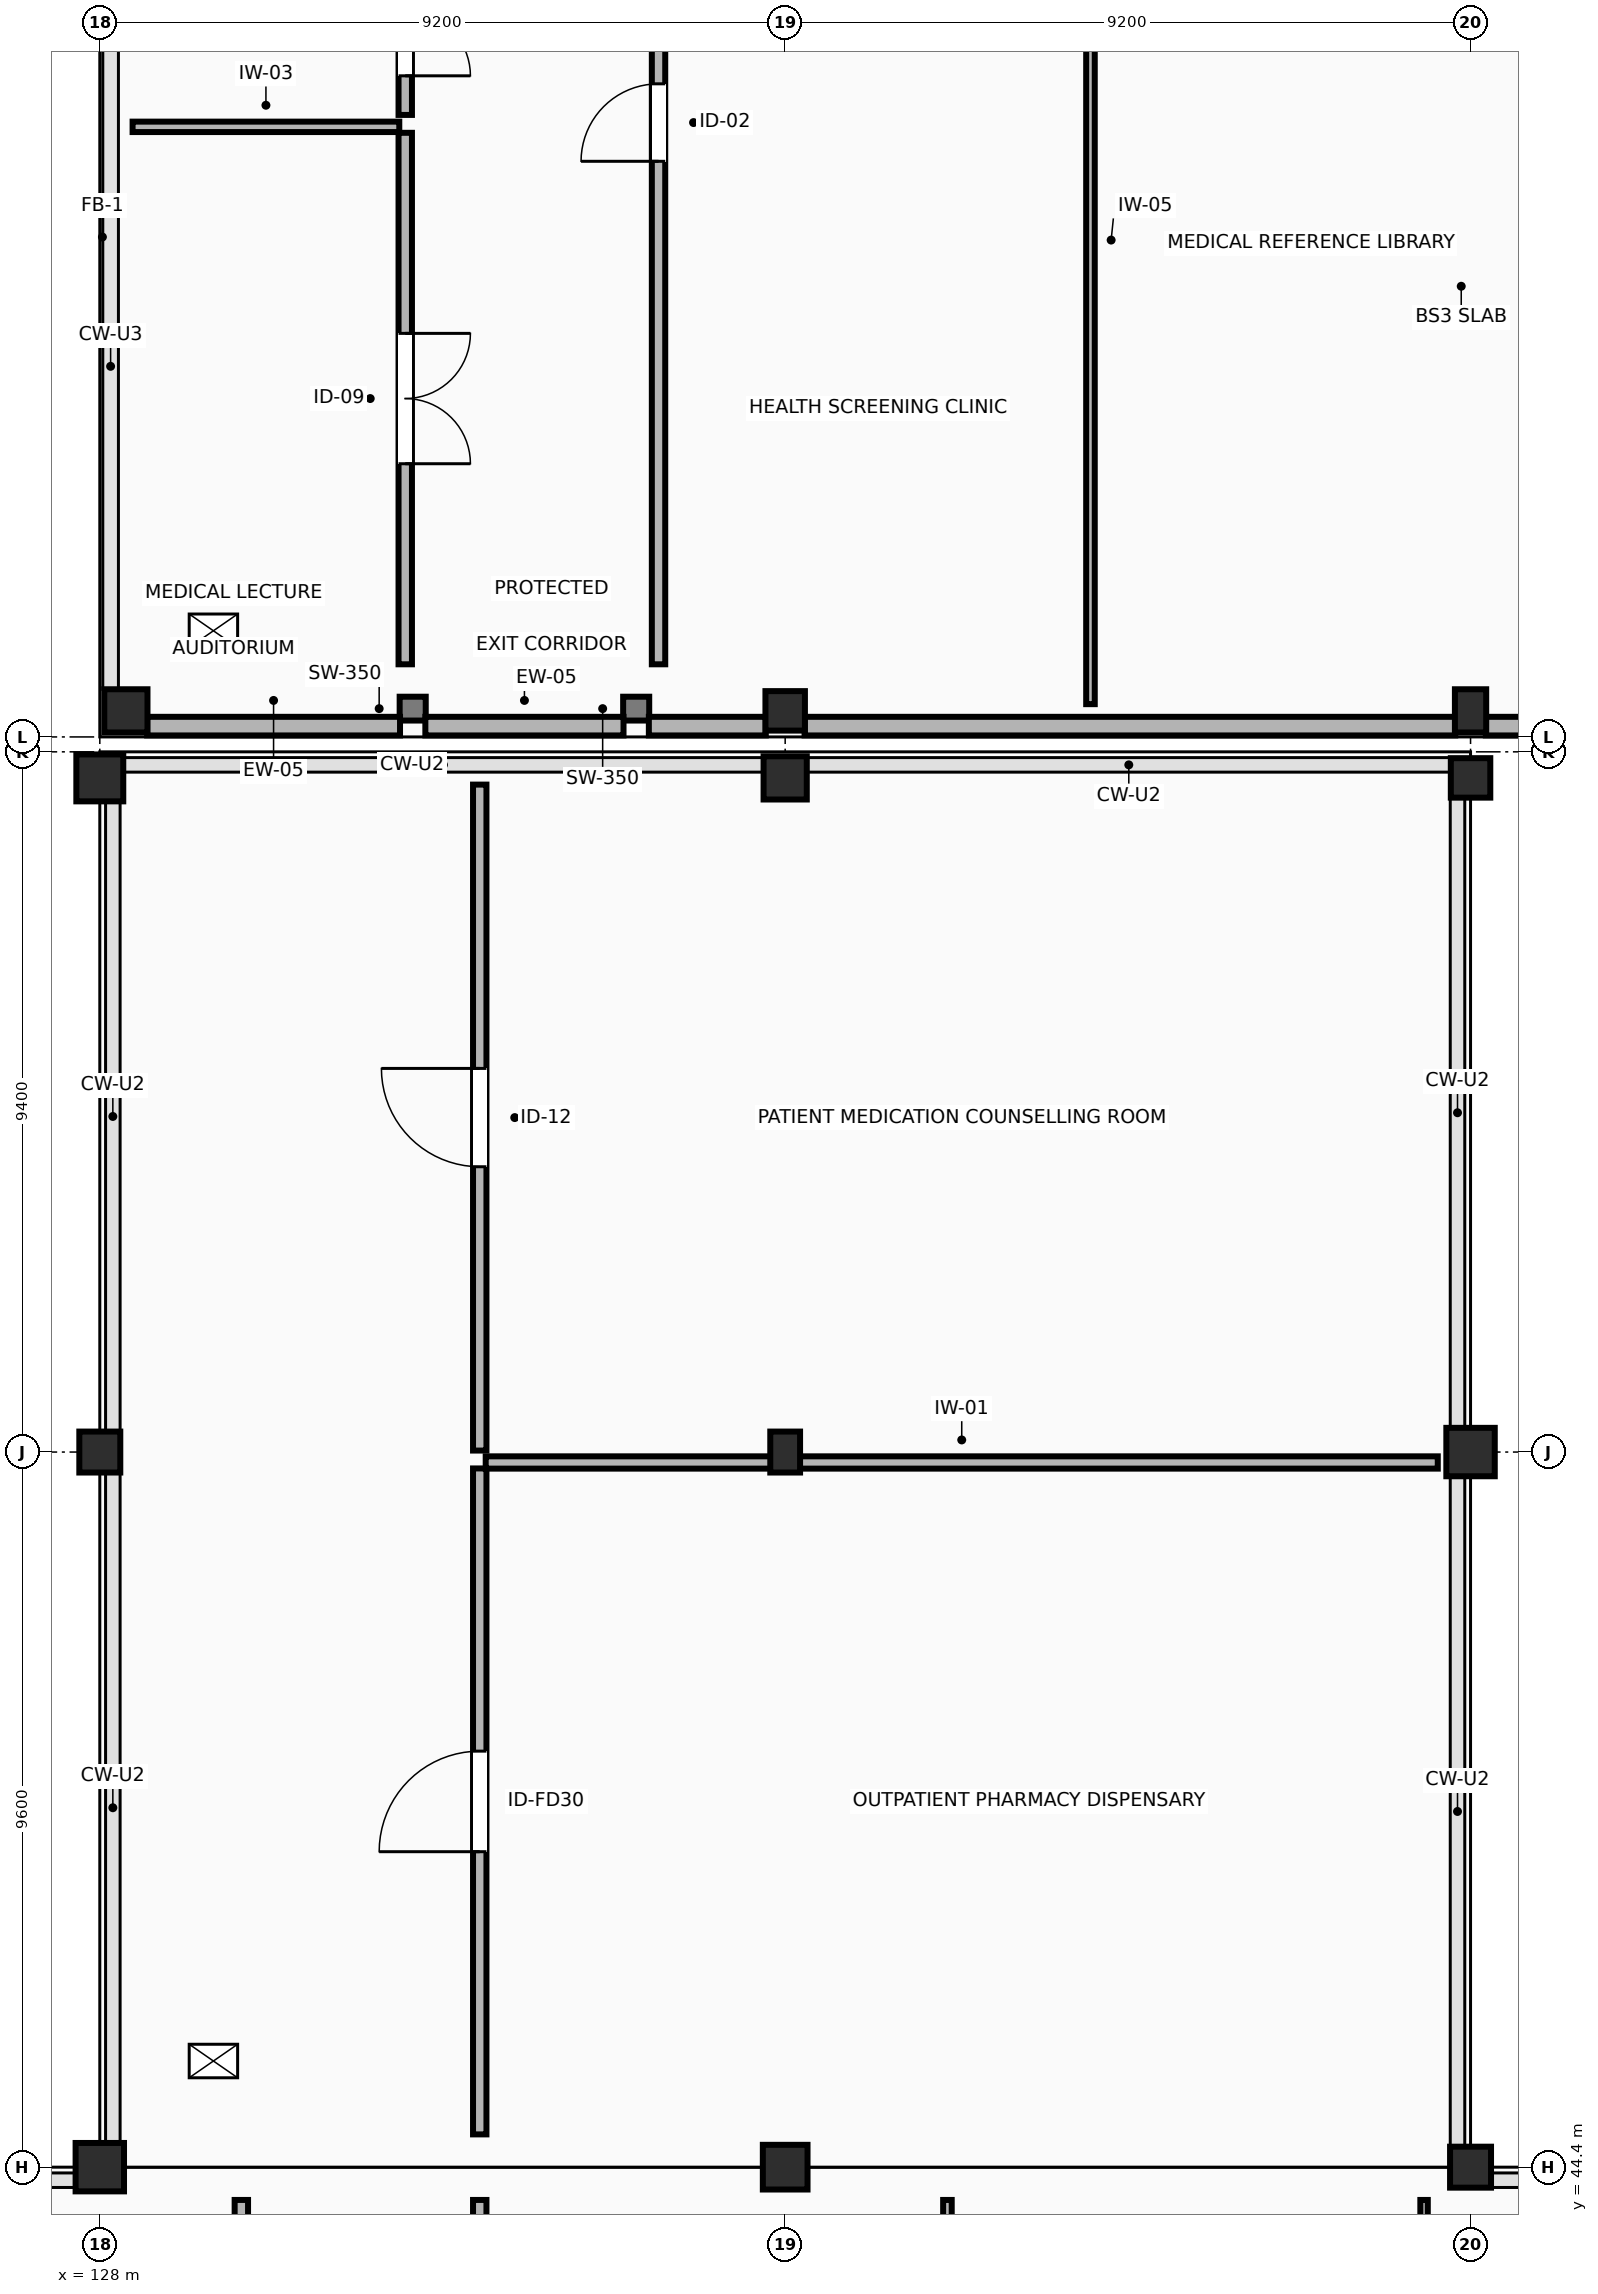
"""IFC4 building model, lengths in metres.
Left out: names, types, materials, properties, quantities, classifications, styles, units other than length and angle.
Written with IfcOpenShell. Run it as: python <this file> out.ifc"""

import sys

from ifc_helpers import new_model, si_unit, direction, frame, frame_2d, origin, origin_2d, place, context, subcontext, project, spatial, rectangle, extrude, element, fill, save


model = new_model("IFC4")
c1 = context("Model", 3, precision=1e-05, world=origin(), true_north=direction((0.0, 1.0)))
c2 = subcontext(c1, "Body", "Model", "MODEL_VIEW")
j1 = project(units=[si_unit("LENGTHUNIT", "METRE"), si_unit("PLANEANGLEUNIT", "RADIAN")], contexts=[c1])
p1 = place(None, origin())
s1 = spatial("IfcSite", under=j1, at=p1, CompositionType="ELEMENT")
p2 = place(p1, origin())
s2 = spatial("IfcBuilding", under=s1, at=p2, CompositionType="ELEMENT")
p3 = place(p2, origin())
s3 = spatial("IfcBuildingStorey", under=s2, at=p3, CompositionType="ELEMENT", Elevation=0.0)
p4 = place(p3, frame((128.0, 44.4, 0.0), z_axis=(0.0, 0.0, 1.0), x_axis=(1.0, 0.0, 0.0)))
e1 = element("IfcColumn", 1, at=p4, inside=s3, PredefinedType="COLUMN", context=c2, shape_type="SweptSolid", body=[
    extrude(rectangle(XDim=0.65, YDim=0.65, at=origin_2d()), origin(), (0.0, 0.0, 1.0), 5.4),
])
p5 = place(p3, frame((128.0, 54.0, -1.75), z_axis=(0.0, 0.0, 1.0), x_axis=(1.0, 0.0, 0.0)))
e2 = element("IfcColumn", 2, at=p5, inside=s3, PredefinedType="COLUMN", context=c2, shape_type="SweptSolid", body=[
    extrude(rectangle(XDim=0.55, YDim=0.55, at=origin_2d()), origin(), (0.0, 0.0, 1.0), 7.15),
])
p6 = place(p3, frame((128.0, 63.05, -1.75), z_axis=(0.0, 0.0, 1.0), x_axis=(1.0, 0.0, 0.0)))
e3 = element("IfcColumn", 3, at=p6, inside=s3, PredefinedType="COLUMN", context=c2, shape_type="SweptSolid", body=[
    extrude(rectangle(XDim=0.63, YDim=0.63, at=origin_2d()), origin(), (0.0, 0.0, 1.0), 7.15),
])
p7 = place(p3, frame((137.2, 44.4, 0.0), z_axis=(0.0, 0.0, 1.0), x_axis=(1.0, 0.0, 0.0)))
e4 = element("IfcColumn", 4, at=p7, inside=s3, PredefinedType="COLUMN", context=c2, shape_type="SweptSolid", body=[
    extrude(rectangle(XDim=0.6, YDim=0.6, at=origin_2d()), origin(), (0.0, 0.0, 1.0), 5.4),
])
p8 = place(p3, frame((137.2, 54.0, -1.75), z_axis=(0.0, 0.0, 1.0), x_axis=(1.0, 0.0, 0.0)))
e5 = element("IfcColumn", 5, at=p8, inside=s3, PredefinedType="COLUMN", context=c2, shape_type="SweptSolid", body=[
    extrude(rectangle(XDim=0.4, YDim=0.55, at=origin_2d()), origin(), (0.0, 0.0, 1.0), 7.15),
])
p9 = place(p3, frame((137.2, 63.05, -1.75), z_axis=(0.0, 0.0, 1.0), x_axis=(1.0, 0.0, 0.0)))
e6 = element("IfcColumn", 6, at=p9, inside=s3, PredefinedType="COLUMN", context=c2, shape_type="SweptSolid", body=[
    extrude(rectangle(XDim=0.58, YDim=0.58, at=origin_2d()), origin(), (0.0, 0.0, 1.0), 7.15),
])
p10 = place(p3, frame((146.4, 44.4, 0.0), z_axis=(0.0, 0.0, 1.0), x_axis=(1.0, 0.0, 0.0)))
e7 = element("IfcColumn", 7, at=p10, inside=s3, PredefinedType="COLUMN", context=c2, shape_type="SweptSolid", body=[
    extrude(rectangle(XDim=0.55, YDim=0.55, at=origin_2d()), origin(), (0.0, 0.0, 1.0), 5.4),
])
p11 = place(p3, frame((146.4, 54.0, -1.75), z_axis=(0.0, 0.0, 1.0), x_axis=(1.0, 0.0, 0.0)))
e8 = element("IfcColumn", 8, at=p11, inside=s3, PredefinedType="COLUMN", context=c2, shape_type="SweptSolid", body=[
    extrude(rectangle(XDim=0.65, YDim=0.65, at=origin_2d()), origin(), (0.0, 0.0, 1.0), 7.15),
])
p12 = place(p3, frame((146.4, 63.05, -1.75), z_axis=(0.0, 0.0, 1.0), x_axis=(1.0, 0.0, 0.0)))
e9 = element("IfcColumn", 9, at=p12, inside=s3, PredefinedType="COLUMN", context=c2, shape_type="SweptSolid", body=[
    extrude(rectangle(XDim=0.53, YDim=0.53, at=origin_2d()), origin(), (0.0, 0.0, 1.0), 7.15),
])
p13 = place(p3, frame((128.35, 63.95, -1.75), z_axis=(0.0, 0.0, 1.0), x_axis=(1.0, 0.0, 0.0)))
e10 = element("IfcColumn", 10, at=p13, inside=s3, PredefinedType="COLUMN", context=c2, shape_type="SweptSolid", body=[
    extrude(rectangle(XDim=0.58, YDim=0.58, at=origin_2d()), origin(), (0.0, 0.0, 1.0), 7.15),
])
p14 = place(p3, frame((137.2, 63.95, -1.75), z_axis=(0.0, 0.0, 1.0), x_axis=(1.0, 0.0, 0.0)))
e11 = element("IfcColumn", 11, at=p14, inside=s3, PredefinedType="COLUMN", context=c2, shape_type="SweptSolid", body=[
    extrude(rectangle(XDim=0.53, YDim=0.53, at=origin_2d()), origin(), (0.0, 0.0, 1.0), 7.15),
])
p15 = place(p3, frame((146.4, 63.95, -1.75), z_axis=(0.0, 0.0, 1.0), x_axis=(1.0, 0.0, 0.0)))
e12 = element("IfcColumn", 12, at=p15, inside=s3, PredefinedType="COLUMN", context=c2, shape_type="SweptSolid", body=[
    extrude(rectangle(XDim=0.42, YDim=0.58, at=origin_2d()), origin(), (0.0, 0.0, 1.0), 7.15),
])
for number, where, z_axis, x_axis in (
    (13, (132.2, 63.82, -1.75), (0.0, 0.0, 1.0), (0.0, 1.0, 0.0)),
    (14, (135.2, 63.82, -1.75), (0.0, 0.0, 1.0), (0.0, 1.0, 0.0)),
):
    element("IfcWall", number, at=place(p3, frame(where, z_axis=z_axis, x_axis=x_axis)), inside=s3, PredefinedType="SHEAR", context=c2, shape_type="SweptSolid", body=[
        extrude(rectangle(XDim=0.32, YDim=0.35, at=frame_2d((0.16, 0.0))), origin(), (0.0, 0.0, 1.0), 5.273),
    ])
p16 = place(p3, frame((128.635, 63.745, 0.0), z_axis=(0.0, 0.0, 1.0), x_axis=(1.0, 0.0, 0.0)))
e15 = element("IfcWall", 15, at=p16, inside=s3, PredefinedType="STANDARD", context=c2, shape_type="SweptSolid", body=[
    extrude(rectangle(XDim=3.395, YDim=0.25, at=frame_2d((1.698, 0.0))), origin(), (0.0, 0.0, 1.0), 3.508),
])
p17 = place(p3, frame((132.37, 63.745, 0.0), z_axis=(0.0, 0.0, 1.0), x_axis=(1.0, 0.0, 0.0)))
e16 = element("IfcWall", 16, at=p17, inside=s3, PredefinedType="STANDARD", context=c2, shape_type="SweptSolid", body=[
    extrude(rectangle(XDim=2.66, YDim=0.25, at=frame_2d((1.33, 0.0))), origin(), (0.0, 0.0, 1.0), 3.508),
])
p18 = place(p3, frame((135.37, 63.745, 0.0), z_axis=(0.0, 0.0, 1.0), x_axis=(1.0, 0.0, 0.0)))
e17 = element("IfcWall", 17, at=p18, inside=s3, PredefinedType="STANDARD", context=c2, shape_type="SweptSolid", body=[
    extrude(rectangle(XDim=1.57, YDim=0.25, at=frame_2d((0.785, 0.0))), origin(), (0.0, 0.0, 1.0), 3.508),
])
p19 = place(p3, frame((137.46, 63.745, 0.0), z_axis=(0.0, 0.0, 1.0), x_axis=(1.0, 0.0, 0.0)))
e18 = element("IfcWall", 18, at=p19, inside=s3, PredefinedType="STANDARD", context=c2, shape_type="SweptSolid", body=[
    extrude(rectangle(XDim=8.735, YDim=0.25, at=frame_2d((4.368, 0.0))), origin(), (0.0, 0.0, 1.0), 4.395),
])
p20 = place(p3, frame((146.605, 63.745, 0.0), z_axis=(0.0, 0.0, 1.0), x_axis=(1.0, 0.0, 0.0)))
e19 = element("IfcWall", 19, at=p20, inside=s3, PredefinedType="STANDARD", context=c2, shape_type="SweptSolid", body=[
    extrude(rectangle(XDim=8.885, YDim=0.25, at=frame_2d((4.442, 0.0))), origin(), (0.0, 0.0, 1.0), 4.395),
])
p21 = place(p20, frame((1.94, 0.0, 0.95)))
e20 = element("IfcOpeningElement", 20, at=p21, cuts=e19, PredefinedType="OPENING", context=c2, shape_type="SweptSolid", body=[
    extrude(rectangle(XDim=1.45, YDim=1.7, at=frame_2d((0.725, 0.85))), frame((0.0, 0.135, 0.0), z_axis=(0.0, -1.0, 0.0), x_axis=(1.0, 0.0, 0.0)), (0.0, 0.0, 1.0), 0.27),
])
p22 = place(p20, frame((5.494, 0.0, 0.95)))
e21 = element("IfcOpeningElement", 21, at=p22, cuts=e19, PredefinedType="OPENING", context=c2, shape_type="SweptSolid", body=[
    extrude(rectangle(XDim=1.45, YDim=1.7, at=frame_2d((0.725, 0.85))), frame((0.0, 0.135, 0.0), z_axis=(0.0, -1.0, 0.0), x_axis=(1.0, 0.0, 0.0)), (0.0, 0.0, 1.0), 0.27),
])
p23 = place(p3, frame((129.9, 43.96, 0.0), z_axis=(0.0, 0.0, 1.0), x_axis=(0.0, -1.0, 0.0)))
e22 = element("IfcWall", 22, at=p23, inside=s3, PredefinedType="PARTITIONING", context=c2, shape_type="SweptSolid", body=[
    extrude(rectangle(XDim=7.095, YDim=0.18, at=frame_2d((3.547, 0.0))), origin(), (0.0, 0.0, 1.0), 5.1),
])
p24 = place(p23, frame((3.028, 0.0, 0.0)))
e23 = element("IfcOpeningElement", 23, at=p24, cuts=e22, PredefinedType="OPENING", context=c2, shape_type="SweptSolid", body=[
    extrude(rectangle(XDim=1.04, YDim=2.15, at=frame_2d((0.52, 1.075))), frame((0.0, 0.1, 0.0), z_axis=(0.0, -1.0, 0.0), x_axis=(1.0, 0.0, 0.0)), (0.0, 0.0, 1.0), 0.2),
])
p25 = place(p3, frame((133.1, 30.18, 0.0), z_axis=(0.0, 0.0, 1.0), x_axis=(0.0, 1.0, 0.0)))
e24 = element("IfcWall", 24, at=p25, inside=s3, PredefinedType="PARTITIONING", context=c2, shape_type="SweptSolid", body=[
    extrude(rectangle(XDim=13.78, YDim=0.18, at=frame_2d((6.89, 0.0))), origin(), (0.0, 0.0, 1.0), 5.1),
])
p26 = place(p25, frame((6.41, 0.0, 0.0)))
e25 = element("IfcOpeningElement", 25, at=p26, cuts=e24, PredefinedType="OPENING", context=c2, shape_type="SweptSolid", body=[
    extrude(rectangle(XDim=0.96, YDim=2.1, at=frame_2d((0.48, 1.05))), frame((0.0, 0.1, 0.0), z_axis=(0.0, -1.0, 0.0), x_axis=(1.0, 0.0, 0.0)), (0.0, 0.0, 1.0), 0.2),
])
p27 = place(p3, frame((139.378, 43.96, 0.0), z_axis=(0.0, 0.0, 1.0), x_axis=(0.0, -1.0, 0.0)))
e26 = element("IfcWall", 26, at=p27, inside=s3, PredefinedType="PARTITIONING", context=c2, shape_type="SweptSolid", body=[
    extrude(rectangle(XDim=10.66, YDim=0.115, at=frame_2d((5.33, 0.0))), origin(), (0.0, 0.0, 1.0), 5.1),
])
p28 = place(p3, frame((145.776, 33.3, 0.0), z_axis=(0.0, 0.0, 1.0), x_axis=(0.0, 1.0, 0.0)))
e27 = element("IfcWall", 27, at=p28, inside=s3, PredefinedType="PARTITIONING", context=c2, shape_type="SweptSolid", body=[
    extrude(rectangle(XDim=10.66, YDim=0.1, at=frame_2d((5.33, 0.0))), origin(), (0.0, 0.0, 1.0), 5.1),
])
p29 = place(p3, frame((133.1, 44.84, 0.0), z_axis=(0.0, 0.0, 1.0), x_axis=(0.0, 1.0, 0.0)))
e28 = element("IfcWall", 28, at=p29, inside=s3, PredefinedType="PARTITIONING", context=c2, shape_type="SweptSolid", body=[
    extrude(rectangle(XDim=8.94, YDim=0.18, at=frame_2d((4.47, 0.0))), origin(), (0.0, 0.0, 1.0), 5.1),
])
p30 = place(p29, frame((3.795, 0.0, 0.0)))
e29 = element("IfcOpeningElement", 29, at=p30, cuts=e28, PredefinedType="OPENING", context=c2, shape_type="SweptSolid", body=[
    extrude(rectangle(XDim=1.35, YDim=2.2, at=frame_2d((0.675, 1.1))), frame((0.0, 0.1, 0.0), z_axis=(0.0, -1.0, 0.0), x_axis=(1.0, 0.0, 0.0)), (0.0, 0.0, 1.0), 0.2),
])
p31 = place(p3, frame((133.18, 53.86, 0.0), z_axis=(0.0, 0.0, 1.0), x_axis=(1.0, 0.0, 0.0)))
e30 = element("IfcWall", 30, at=p31, inside=s3, PredefinedType="PARTITIONING", context=c2, shape_type="SweptSolid", body=[
    extrude(rectangle(XDim=12.78, YDim=0.165, at=frame_2d((6.39, 0.0))), origin(), (0.0, 0.0, 1.0), 4.435),
])
p32 = place(p3, frame((133.1, 54.02, 0.0), z_axis=(0.0, 0.0, 1.0), x_axis=(0.0, 1.0, 0.0)))
e31 = element("IfcWall", 31, at=p32, inside=s3, PredefinedType="PARTITIONING", context=c2, shape_type="SweptSolid", body=[
    extrude(rectangle(XDim=8.94, YDim=0.18, at=frame_2d((4.47, 0.0))), origin(), (0.0, 0.0, 1.0), 5.1),
])
p33 = place(p32, frame((3.81, 0.0, 0.0)))
e32 = element("IfcOpeningElement", 32, at=p33, cuts=e31, PredefinedType="OPENING", context=c2, shape_type="SweptSolid", body=[
    extrude(rectangle(XDim=1.32, YDim=2.22, at=frame_2d((0.66, 1.11))), frame((0.0, 0.1, 0.0), z_axis=(0.0, -1.0, 0.0), x_axis=(1.0, 0.0, 0.0)), (0.0, 0.0, 1.0), 0.2),
])
p34 = place(p3, frame((128.44, 71.79, 0.0), z_axis=(0.0, 0.0, 1.0), x_axis=(1.0, 0.0, 0.0)))
e33 = element("IfcWall", 33, at=p34, inside=s3, PredefinedType="PARTITIONING", context=c2, shape_type="SweptSolid", body=[
    extrude(rectangle(XDim=3.58, YDim=0.14, at=frame_2d((1.79, 0.0))), origin(), (0.0, 0.0, 1.0), 5.1),
])
p35 = place(p3, frame((132.1, 71.71, 0.0), z_axis=(0.0, 0.0, 1.0), x_axis=(0.0, -1.0, 0.0)))
e34 = element("IfcWall", 34, at=p35, inside=s3, PredefinedType="PARTITIONING", context=c2, shape_type="SweptSolid", body=[
    extrude(rectangle(XDim=7.135, YDim=0.18, at=frame_2d((3.567, 0.0))), origin(), (0.0, 0.0, 1.0), 5.1),
])
p36 = place(p35, frame((2.692, 0.0, 0.0)))
e35 = element("IfcOpeningElement", 35, at=p36, cuts=e34, PredefinedType="OPENING", context=c2, shape_type="SweptSolid", body=[
    extrude(rectangle(XDim=1.75, YDim=2.35, at=frame_2d((0.875, 1.175))), frame((0.0, 0.1, 0.0), z_axis=(0.0, -1.0, 0.0), x_axis=(1.0, 0.0, 0.0)), (0.0, 0.0, 1.0), 0.2),
])
p37 = place(p3, frame((132.1, 74.75, 0.0), z_axis=(0.0, 0.0, 1.0), x_axis=(0.0, -1.0, 0.0)))
e36 = element("IfcWall", 36, at=p37, inside=s3, PredefinedType="PARTITIONING", context=c2, shape_type="SweptSolid", body=[
    extrude(rectangle(XDim=2.8, YDim=0.18, at=frame_2d((1.4, 0.0))), origin(), (0.0, 0.0, 1.0), 5.1),
])
p38 = place(p37, frame((0.525, 0.0, 0.0)))
e37 = element("IfcOpeningElement", 37, at=p38, cuts=e36, PredefinedType="OPENING", context=c2, shape_type="SweptSolid", body=[
    extrude(rectangle(XDim=1.75, YDim=2.35, at=frame_2d((0.875, 1.175))), frame((0.0, 0.1, 0.0), z_axis=(0.0, -1.0, 0.0), x_axis=(1.0, 0.0, 0.0)), (0.0, 0.0, 1.0), 0.2),
])
p39 = place(p3, frame((141.298, 79.62, 0.0), z_axis=(0.0, 0.0, 1.0), x_axis=(0.0, -1.0, 0.0)))
e38 = element("IfcWall", 38, at=p39, inside=s3, PredefinedType="PARTITIONING", context=c2, shape_type="SweptSolid", body=[
    extrude(rectangle(XDim=15.58, YDim=0.115, at=frame_2d((7.79, 0.0))), origin(), (0.0, 0.0, 1.0), 5.1),
])
p40 = place(p3, frame((135.5, 64.575, 0.0), z_axis=(0.0, 0.0, 1.0), x_axis=(0.0, 1.0, 0.0)))
e39 = element("IfcWall", 39, at=p40, inside=s3, PredefinedType="PARTITIONING", context=c2, shape_type="SweptSolid", body=[
    extrude(rectangle(XDim=15.045, YDim=0.18, at=frame_2d((7.522, 0.0))), origin(), (0.0, 0.0, 1.0), 5.1),
])
p41 = place(p40, frame((6.752, 0.0, 0.0)))
e40 = element("IfcOpeningElement", 40, at=p41, cuts=e39, PredefinedType="OPENING", context=c2, shape_type="SweptSolid", body=[
    extrude(rectangle(XDim=1.04, YDim=2.15, at=frame_2d((0.52, 1.075))), frame((0.0, 0.1, 0.0), z_axis=(0.0, -1.0, 0.0), x_axis=(1.0, 0.0, 0.0)), (0.0, 0.0, 1.0), 0.2),
])
p42 = place(p30, origin())
e41 = element("IfcDoor", 41, at=p42, inside=s3, OperationType="SINGLE_SWING_LEFT", PredefinedType="DOOR", context=c2, shape_type="SweptSolid", body=[
    extrude(rectangle(XDim=1.35, YDim=2.2, at=frame_2d((0.675, 1.1))), frame((0.0, 0.025, 0.0), z_axis=(0.0, -1.0, 0.0), x_axis=(1.0, 0.0, 0.0)), (0.0, 0.0, 1.0), 0.05),
])
fill(e29, e41)
p43 = place(p33, origin())
e42 = element("IfcDoor", 42, at=p43, inside=s3, OperationType="SINGLE_SWING_RIGHT", PredefinedType="DOOR", context=c2, shape_type="SweptSolid", body=[
    extrude(rectangle(XDim=1.32, YDim=2.22, at=frame_2d((0.66, 1.11))), frame((0.0, 0.025, 0.0), z_axis=(0.0, -1.0, 0.0), x_axis=(1.0, 0.0, 0.0)), (0.0, 0.0, 1.0), 0.05),
])
fill(e32, e42)
p44 = place(p36, origin())
e43 = element("IfcDoor", 43, at=p44, inside=s3, OperationType="DOUBLE_DOOR_SINGLE_SWING", PredefinedType="DOOR", context=c2, shape_type="SweptSolid", body=[
    extrude(rectangle(XDim=1.75, YDim=2.35, at=frame_2d((0.875, 1.175))), frame((0.0, 0.025, 0.0), z_axis=(0.0, -1.0, 0.0), x_axis=(1.0, 0.0, 0.0)), (0.0, 0.0, 1.0), 0.05),
])
fill(e35, e43)
p45 = place(p38, origin())
e44 = element("IfcDoor", 44, at=p45, inside=s3, OperationType="DOUBLE_DOOR_SINGLE_SWING", PredefinedType="DOOR", context=c2, shape_type="SweptSolid", body=[
    extrude(rectangle(XDim=1.75, YDim=2.35, at=frame_2d((0.875, 1.175))), frame((0.0, 0.025, 0.0), z_axis=(0.0, -1.0, 0.0), x_axis=(1.0, 0.0, 0.0)), (0.0, 0.0, 1.0), 0.05),
])
fill(e37, e44)
p46 = place(p41, origin())
e45 = element("IfcDoor", 45, at=p46, inside=s3, OperationType="SINGLE_SWING_LEFT", PredefinedType="DOOR", context=c2, shape_type="SweptSolid", body=[
    extrude(rectangle(XDim=1.04, YDim=2.15, at=frame_2d((0.52, 1.075))), frame((0.0, 0.025, 0.0), z_axis=(0.0, -1.0, 0.0), x_axis=(1.0, 0.0, 0.0)), (0.0, 0.0, 1.0), 0.05),
])
fill(e40, e45)
save(model, sys.argv[1])
